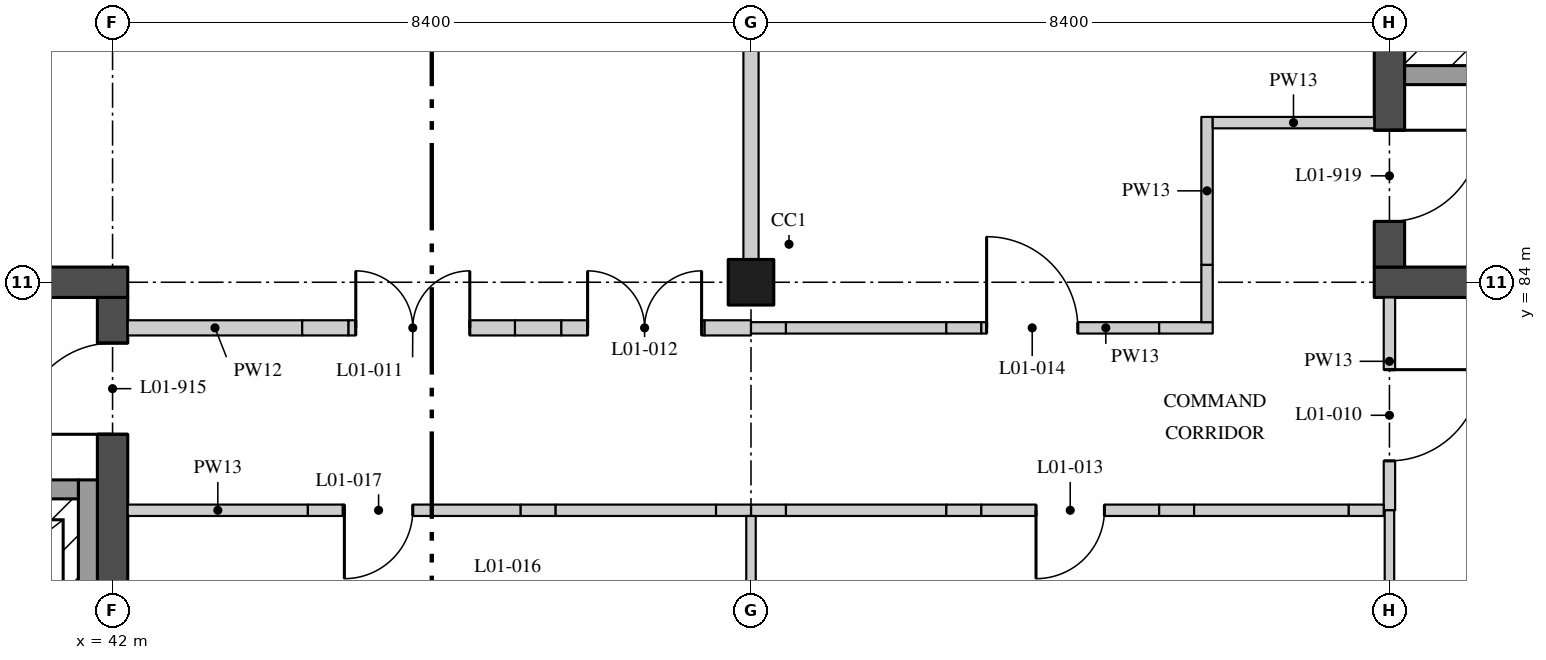
"""IFC4 building model, lengths in metres.
Left out: names, types, materials, properties, quantities, classifications, styles, units other than length and angle.
Written with IfcOpenShell. Run it as: python <this file> out.ifc"""

import sys

from ifc_helpers import new_model, si_unit, direction, frame, frame_2d, origin, origin_2d, place, context, subcontext, project, spatial, rectangle, extrude, element, fill, save


model = new_model("IFC4")
c1 = context("Model", 3, precision=1e-05, world=origin(), true_north=direction((0.0, 1.0)))
c2 = subcontext(c1, "Body", "Model", "MODEL_VIEW")
j1 = project(units=[si_unit("LENGTHUNIT", "METRE"), si_unit("PLANEANGLEUNIT", "RADIAN")], contexts=[c1])
p1 = place(None, origin())
s1 = spatial("IfcSite", under=j1, at=p1, CompositionType="ELEMENT")
p2 = place(p1, origin())
s2 = spatial("IfcBuilding", under=s1, at=p2, CompositionType="ELEMENT")
p3 = place(p2, frame((0.0, 0.0, 5.4)))
s3 = spatial("IfcBuildingStorey", under=s2, at=p3, CompositionType="ELEMENT", Elevation=5.4)
p4 = place(p3, frame((50.4, 84.0, 0.0), z_axis=(0.0, 0.0, 1.0), x_axis=(1.0, 0.0, 0.0)))
e1 = element("IfcColumn", 1, at=p4, inside=s3, PredefinedType="COLUMN", context=c2, shape_type="SweptSolid", body=[
    extrude(rectangle(XDim=0.6, YDim=0.6, at=origin_2d()), origin(), (0.0, 0.0, 1.0), 4.37),
])
p5 = place(p3, frame((33.4, 84.0, 0.0), z_axis=(0.0, 0.0, 1.0), x_axis=(1.0, 0.0, 0.0)))
e2 = element("IfcWall", 2, at=p5, inside=s3, PredefinedType="SHEAR", context=c2, shape_type="SweptSolid", body=[
    extrude(rectangle(XDim=8.8, YDim=0.4, at=frame_2d((4.4, 0.0))), origin(), (0.0, 0.0, 1.0), 4.37),
])
p6 = place(p3, frame((42.0, 75.8, 0.0), z_axis=(0.0, 0.0, 1.0), x_axis=(0.0, 1.0, 0.0)))
e3 = element("IfcWall", 3, at=p6, inside=s3, PredefinedType="SHEAR", context=c2, shape_type="SweptSolid", body=[
    extrude(rectangle(XDim=8.0, YDim=0.4, at=frame_2d((4.0, 0.0))), origin(), (0.0, 0.0, 1.0), 4.37),
])
p7 = place(p6, frame((6.2, 0.0, 0.0)))
e4 = element("IfcOpeningElement", 4, at=p7, cuts=e3, PredefinedType="OPENING", context=c2, shape_type="SweptSolid", body=[
    extrude(rectangle(XDim=1.2, YDim=2.1, at=frame_2d((0.6, 1.05))), frame((0.0, 0.21, 0.0), z_axis=(0.0, -1.0, 0.0), x_axis=(1.0, 0.0, 0.0)), (0.0, 0.0, 1.0), 0.42),
])
p8 = place(p3, frame((58.6, 84.0, 0.0), z_axis=(0.0, 0.0, 1.0), x_axis=(1.0, 0.0, 0.0)))
e5 = element("IfcWall", 5, at=p8, inside=s3, PredefinedType="SHEAR", context=c2, shape_type="SweptSolid", body=[
    extrude(rectangle(XDim=8.8, YDim=0.4, at=frame_2d((4.4, 0.0))), origin(), (0.0, 0.0, 1.0), 4.37),
])
p9 = place(p3, frame((58.8, 84.2, 0.0), z_axis=(0.0, 0.0, 1.0), x_axis=(0.0, 1.0, 0.0)))
e6 = element("IfcWall", 6, at=p9, inside=s3, PredefinedType="SHEAR", context=c2, shape_type="SweptSolid", body=[
    extrude(rectangle(XDim=8.0, YDim=0.4, at=frame_2d((4.0, 0.0))), origin(), (0.0, 0.0, 1.0), 4.37),
])
p10 = place(p9, frame((0.6, 0.0, 0.0)))
e7 = element("IfcOpeningElement", 7, at=p10, cuts=e6, PredefinedType="OPENING", context=c2, shape_type="SweptSolid", body=[
    extrude(rectangle(XDim=1.2, YDim=2.1, at=frame_2d((0.6, 1.05))), frame((0.0, 0.21, 0.0), z_axis=(0.0, -1.0, 0.0), x_axis=(1.0, 0.0, 0.0)), (0.0, 0.0, 1.0), 0.42),
])
p11 = place(p3, frame((61.8, 86.725, 0.0), z_axis=(0.0, 0.0, 1.0), x_axis=(-1.0, 0.0, 0.0)))
e8 = element("IfcWall", 8, at=p11, inside=s3, PredefinedType="SOLIDWALL", context=c2, shape_type="SweptSolid", body=[
    extrude(rectangle(XDim=2.8, YDim=0.25, at=frame_2d((1.4, 0.0))), origin(), (0.0, 0.0, 1.0), 4.37),
])
p12 = place(p3, frame((41.675, 78.75, 0.0), z_axis=(0.0, 0.0, 1.0), x_axis=(0.0, 1.0, 0.0)))
e9 = element("IfcWall", 9, at=p12, inside=s3, PredefinedType="SOLIDWALL", context=c2, shape_type="SweptSolid", body=[
    extrude(rectangle(XDim=2.65, YDim=0.25, at=frame_2d((1.325, 0.0))), origin(), (0.0, 0.0, 1.0), 4.37),
])
p13 = place(p3, frame((39.25, 81.275, 0.0), z_axis=(0.0, 0.0, 1.0), x_axis=(1.0, 0.0, 0.0)))
e10 = element("IfcWall", 10, at=p13, inside=s3, PredefinedType="SOLIDWALL", context=c2, shape_type="SweptSolid", body=[
    extrude(rectangle(XDim=2.3, YDim=0.25, at=frame_2d((1.15, 0.0))), origin(), (0.0, 0.0, 1.0), 4.37),
])
p14 = place(p3, frame((58.8, 81.0, 0.0), z_axis=(0.0, 0.0, 1.0), x_axis=(0.0, 1.0, 0.0)))
e11 = element("IfcWall", 11, at=p14, inside=s3, PredefinedType="PARTITIONING", context=c2, shape_type="SweptSolid", body=[
    extrude(rectangle(XDim=2.8, YDim=0.15, at=frame_2d((1.4, 0.0))), origin(), (0.0, 0.0, 1.0), 3.746),
])
p15 = place(p14, frame((0.65, 0.0, 0.0)))
e12 = element("IfcOpeningElement", 12, at=p15, cuts=e11, PredefinedType="OPENING", context=c2, shape_type="SweptSolid", body=[
    extrude(rectangle(XDim=1.2, YDim=2.4, at=frame_2d((0.6, 1.2))), frame((0.0, 0.085, 0.0), z_axis=(0.0, -1.0, 0.0), x_axis=(1.0, 0.0, 0.0)), (0.0, 0.0, 1.0), 0.17),
])
p16 = place(p3, frame((58.8, 75.95, 0.0), z_axis=(0.0, 0.0, 1.0), x_axis=(0.0, 1.0, 0.0)))
e13 = element("IfcWall", 13, at=p16, inside=s3, PredefinedType="PARTITIONING", context=c2, shape_type="SweptSolid", body=[
    extrude(rectangle(XDim=5.05, YDim=0.125, at=frame_2d((2.525, 0.0))), origin(), (0.0, 0.0, 1.0), 3.746),
])
p17 = place(p3, frame((42.2, 83.4, 0.0), z_axis=(0.0, 0.0, 1.0), x_axis=(1.0, 0.0, 0.0)))
e14 = element("IfcWall", 14, at=p17, inside=s3, PredefinedType="PARTITIONING", context=c2, shape_type="SweptSolid", body=[
    extrude(rectangle(XDim=2.295, YDim=0.2, at=frame_2d((1.147, 0.0))), origin(), (0.0, 0.0, 1.0), 4.37),
])
p18 = place(p3, frame((44.495, 83.4, 0.0), z_axis=(0.0, 0.0, 1.0), x_axis=(1.0, 0.0, 0.0)))
e15 = element("IfcWall", 15, at=p18, inside=s3, PredefinedType="PARTITIONING", context=c2, shape_type="SweptSolid", body=[
    extrude(rectangle(XDim=0.61, YDim=0.2, at=frame_2d((0.305, 0.0))), origin(), (0.0, 0.0, 1.0), 3.895),
])
p19 = place(p3, frame((45.105, 83.4, 0.0), z_axis=(0.0, 0.0, 1.0), x_axis=(1.0, 0.0, 0.0)))
e16 = element("IfcWall", 16, at=p19, inside=s3, PredefinedType="PARTITIONING", context=c2, shape_type="SweptSolid", body=[
    extrude(rectangle(XDim=2.19, YDim=0.2, at=frame_2d((1.095, 0.0))), origin(), (0.0, 0.0, 1.0), 4.37),
])
p20 = place(p19, frame((0.095, 0.0, 0.0)))
e17 = element("IfcOpeningElement", 17, at=p20, cuts=e16, PredefinedType="OPENING", context=c2, shape_type="SweptSolid", body=[
    extrude(rectangle(XDim=1.5, YDim=2.1, at=frame_2d((0.75, 1.05))), frame((0.0, 0.11, 0.0), z_axis=(0.0, -1.0, 0.0), x_axis=(1.0, 0.0, 0.0)), (0.0, 0.0, 1.0), 0.22),
])
p21 = place(p3, frame((47.295, 83.4, 0.0), z_axis=(0.0, 0.0, 1.0), x_axis=(1.0, 0.0, 0.0)))
e18 = element("IfcWall", 18, at=p21, inside=s3, PredefinedType="PARTITIONING", context=c2, shape_type="SweptSolid", body=[
    extrude(rectangle(XDim=0.61, YDim=0.2, at=frame_2d((0.305, 0.0))), origin(), (0.0, 0.0, 1.0), 3.895),
])
p22 = place(p3, frame((47.905, 83.4, 0.0), z_axis=(0.0, 0.0, 1.0), x_axis=(1.0, 0.0, 0.0)))
e19 = element("IfcWall", 19, at=p22, inside=s3, PredefinedType="PARTITIONING", context=c2, shape_type="SweptSolid", body=[
    extrude(rectangle(XDim=1.885, YDim=0.2, at=frame_2d((0.942, 0.0))), origin(), (0.0, 0.0, 1.0), 4.37),
])
p23 = place(p22, frame((0.345, 0.0, 0.0)))
e20 = element("IfcOpeningElement", 20, at=p23, cuts=e19, PredefinedType="OPENING", context=c2, shape_type="SweptSolid", body=[
    extrude(rectangle(XDim=1.5, YDim=2.1, at=frame_2d((0.75, 1.05))), frame((0.0, 0.11, 0.0), z_axis=(0.0, -1.0, 0.0), x_axis=(1.0, 0.0, 0.0)), (0.0, 0.0, 1.0), 0.22),
])
p24 = place(p3, frame((49.79, 83.4, 0.0), z_axis=(0.0, 0.0, 1.0), x_axis=(1.0, 0.0, 0.0)))
e21 = element("IfcWall", 21, at=p24, inside=s3, PredefinedType="PARTITIONING", context=c2, shape_type="SweptSolid", body=[
    extrude(rectangle(XDim=0.61, YDim=0.2, at=frame_2d((0.305, 0.0))), origin(), (0.0, 0.0, 1.0), 3.746),
])
p25 = place(p3, frame((50.4, 81.0, 0.0), z_axis=(0.0, 0.0, 1.0), x_axis=(1.0, 0.0, 0.0)))
e22 = element("IfcWall", 22, at=p25, inside=s3, PredefinedType="PARTITIONING", context=c2, shape_type="SweptSolid", body=[
    extrude(rectangle(XDim=0.46, YDim=0.15, at=frame_2d((0.23, 0.0))), origin(), (0.0, 0.0, 1.0), 3.746),
])
p26 = place(p3, frame((50.86, 81.0, 0.0), z_axis=(0.0, 0.0, 1.0), x_axis=(1.0, 0.0, 0.0)))
e23 = element("IfcWall", 23, at=p26, inside=s3, PredefinedType="PARTITIONING", context=c2, shape_type="SweptSolid", body=[
    extrude(rectangle(XDim=2.11, YDim=0.15, at=frame_2d((1.055, 0.0))), origin(), (0.0, 0.0, 1.0), 4.37),
])
p27 = place(p3, frame((52.97, 81.0, 0.0), z_axis=(0.0, 0.0, 1.0), x_axis=(1.0, 0.0, 0.0)))
e24 = element("IfcWall", 24, at=p27, inside=s3, PredefinedType="PARTITIONING", context=c2, shape_type="SweptSolid", body=[
    extrude(rectangle(XDim=0.46, YDim=0.15, at=frame_2d((0.23, 0.0))), origin(), (0.0, 0.0, 1.0), 3.895),
])
p28 = place(p3, frame((53.43, 81.0, 0.0), z_axis=(0.0, 0.0, 1.0), x_axis=(1.0, 0.0, 0.0)))
e25 = element("IfcWall", 25, at=p28, inside=s3, PredefinedType="PARTITIONING", context=c2, shape_type="SweptSolid", body=[
    extrude(rectangle(XDim=2.34, YDim=0.15, at=frame_2d((1.17, 0.0))), origin(), (0.0, 0.0, 1.0), 4.37),
])
p29 = place(p28, frame((0.72, 0.0, 0.0)))
e26 = element("IfcOpeningElement", 26, at=p29, cuts=e25, PredefinedType="OPENING", context=c2, shape_type="SweptSolid", body=[
    extrude(rectangle(XDim=0.9, YDim=2.1, at=frame_2d((0.45, 1.05))), frame((0.0, 0.085, 0.0), z_axis=(0.0, -1.0, 0.0), x_axis=(1.0, 0.0, 0.0)), (0.0, 0.0, 1.0), 0.17),
])
p30 = place(p3, frame((55.77, 81.0, 0.0), z_axis=(0.0, 0.0, 1.0), x_axis=(1.0, 0.0, 0.0)))
e27 = element("IfcWall", 27, at=p30, inside=s3, PredefinedType="PARTITIONING", context=c2, shape_type="SweptSolid", body=[
    extrude(rectangle(XDim=0.46, YDim=0.15, at=frame_2d((0.23, 0.0))), origin(), (0.0, 0.0, 1.0), 3.895),
])
p31 = place(p3, frame((56.23, 81.0, 0.0), z_axis=(0.0, 0.0, 1.0), x_axis=(1.0, 0.0, 0.0)))
e28 = element("IfcWall", 28, at=p31, inside=s3, PredefinedType="PARTITIONING", context=c2, shape_type="SweptSolid", body=[
    extrude(rectangle(XDim=2.035, YDim=0.15, at=frame_2d((1.018, 0.0))), origin(), (0.0, 0.0, 1.0), 4.37),
])
for number, where, z_axis, x_axis in (
    (29, (58.265, 81.0, 0.0), (0.0, 0.0, 1.0), (1.0, 0.0, 0.0)),
    (30, (50.4, 83.4, 0.0), (0.0, 0.0, 1.0), (1.0, 0.0, 0.0)),
):
    element("IfcWall", number, at=place(p3, frame(where, z_axis=z_axis, x_axis=x_axis)), inside=s3, PredefinedType="PARTITIONING", context=c2, shape_type="SweptSolid", body=[
        extrude(rectangle(XDim=0.46, YDim=0.15, at=frame_2d((0.23, 0.0))), origin(), (0.0, 0.0, 1.0), 3.746),
    ])
p32 = place(p3, frame((50.86, 83.4, 0.0), z_axis=(0.0, 0.0, 1.0), x_axis=(1.0, 0.0, 0.0)))
e31 = element("IfcWall", 31, at=p32, inside=s3, PredefinedType="PARTITIONING", context=c2, shape_type="SweptSolid", body=[
    extrude(rectangle(XDim=2.11, YDim=0.15, at=frame_2d((1.055, 0.0))), origin(), (0.0, 0.0, 1.0), 4.37),
])
p33 = place(p3, frame((52.97, 83.4, 0.0), z_axis=(0.0, 0.0, 1.0), x_axis=(1.0, 0.0, 0.0)))
e32 = element("IfcWall", 32, at=p33, inside=s3, PredefinedType="PARTITIONING", context=c2, shape_type="SweptSolid", body=[
    extrude(rectangle(XDim=0.46, YDim=0.15, at=frame_2d((0.23, 0.0))), origin(), (0.0, 0.0, 1.0), 3.895),
])
p34 = place(p3, frame((53.43, 83.4, 0.0), z_axis=(0.0, 0.0, 1.0), x_axis=(1.0, 0.0, 0.0)))
e33 = element("IfcWall", 33, at=p34, inside=s3, PredefinedType="PARTITIONING", context=c2, shape_type="SweptSolid", body=[
    extrude(rectangle(XDim=2.34, YDim=0.15, at=frame_2d((1.17, 0.0))), origin(), (0.0, 0.0, 1.0), 4.37),
])
p35 = place(p34, frame((0.07, 0.0, 0.0)))
e34 = element("IfcOpeningElement", 34, at=p35, cuts=e33, PredefinedType="OPENING", context=c2, shape_type="SweptSolid", body=[
    extrude(rectangle(XDim=1.2, YDim=2.4, at=frame_2d((0.6, 1.2))), frame((0.0, 0.085, 0.0), z_axis=(0.0, -1.0, 0.0), x_axis=(1.0, 0.0, 0.0)), (0.0, 0.0, 1.0), 0.17),
])
p36 = place(p3, frame((55.77, 83.4, 0.0), z_axis=(0.0, 0.0, 1.0), x_axis=(1.0, 0.0, 0.0)))
e35 = element("IfcWall", 35, at=p36, inside=s3, PredefinedType="PARTITIONING", context=c2, shape_type="SweptSolid", body=[
    extrude(rectangle(XDim=0.705, YDim=0.15, at=frame_2d((0.353, 0.0))), origin(), (0.0, 0.0, 1.0), 3.895),
])
p37 = place(p3, frame((56.4, 83.475, 0.0), z_axis=(0.0, 0.0, 1.0), x_axis=(0.0, 1.0, 0.0)))
e36 = element("IfcWall", 36, at=p37, inside=s3, PredefinedType="PARTITIONING", context=c2, shape_type="SweptSolid", body=[
    extrude(rectangle(XDim=0.755, YDim=0.15, at=frame_2d((0.377, 0.0))), origin(), (0.0, 0.0, 1.0), 3.746),
])
p38 = place(p3, frame((56.4, 84.23, 0.0), z_axis=(0.0, 0.0, 1.0), x_axis=(0.0, 1.0, 0.0)))
e37 = element("IfcWall", 37, at=p38, inside=s3, PredefinedType="PARTITIONING", context=c2, shape_type="SweptSolid", body=[
    extrude(rectangle(XDim=1.945, YDim=0.15, at=frame_2d((0.973, 0.0))), origin(), (0.0, 0.0, 1.0), 4.37),
])
p39 = place(p3, frame((56.475, 86.1, 0.0), z_axis=(0.0, 0.0, 1.0), x_axis=(1.0, 0.0, 0.0)))
e38 = element("IfcWall", 38, at=p39, inside=s3, PredefinedType="PARTITIONING", context=c2, shape_type="SweptSolid", body=[
    extrude(rectangle(XDim=2.125, YDim=0.15, at=frame_2d((1.062, 0.0))), origin(), (0.0, 0.0, 1.0), 4.37),
])
p40 = place(p3, frame((42.2, 81.0, 0.0), z_axis=(0.0, 0.0, 1.0), x_axis=(1.0, 0.0, 0.0)))
e39 = element("IfcWall", 39, at=p40, inside=s3, PredefinedType="PARTITIONING", context=c2, shape_type="SweptSolid", body=[
    extrude(rectangle(XDim=2.37, YDim=0.15, at=frame_2d((1.185, 0.0))), origin(), (0.0, 0.0, 1.0), 4.37),
])
p41 = place(p3, frame((44.57, 81.0, 0.0), z_axis=(0.0, 0.0, 1.0), x_axis=(1.0, 0.0, 0.0)))
e40 = element("IfcWall", 40, at=p41, inside=s3, PredefinedType="PARTITIONING", context=c2, shape_type="SweptSolid", body=[
    extrude(rectangle(XDim=0.46, YDim=0.15, at=frame_2d((0.23, 0.0))), origin(), (0.0, 0.0, 1.0), 3.895),
])
p42 = place(p3, frame((45.03, 81.0, 0.0), z_axis=(0.0, 0.0, 1.0), x_axis=(1.0, 0.0, 0.0)))
e41 = element("IfcWall", 41, at=p42, inside=s3, PredefinedType="PARTITIONING", context=c2, shape_type="SweptSolid", body=[
    extrude(rectangle(XDim=2.34, YDim=0.15, at=frame_2d((1.17, 0.0))), origin(), (0.0, 0.0, 1.0), 4.37),
])
p43 = place(p42, frame((0.02, 0.0, 0.0)))
e42 = element("IfcOpeningElement", 42, at=p43, cuts=e41, PredefinedType="OPENING", context=c2, shape_type="SweptSolid", body=[
    extrude(rectangle(XDim=0.9, YDim=2.1, at=frame_2d((0.45, 1.05))), frame((0.0, 0.085, 0.0), z_axis=(0.0, -1.0, 0.0), x_axis=(1.0, 0.0, 0.0)), (0.0, 0.0, 1.0), 0.17),
])
p44 = place(p3, frame((47.37, 81.0, 0.0), z_axis=(0.0, 0.0, 1.0), x_axis=(1.0, 0.0, 0.0)))
e43 = element("IfcWall", 43, at=p44, inside=s3, PredefinedType="PARTITIONING", context=c2, shape_type="SweptSolid", body=[
    extrude(rectangle(XDim=0.46, YDim=0.15, at=frame_2d((0.23, 0.0))), origin(), (0.0, 0.0, 1.0), 3.895),
])
p45 = place(p3, frame((47.83, 81.0, 0.0), z_axis=(0.0, 0.0, 1.0), x_axis=(1.0, 0.0, 0.0)))
e44 = element("IfcWall", 44, at=p45, inside=s3, PredefinedType="PARTITIONING", context=c2, shape_type="SweptSolid", body=[
    extrude(rectangle(XDim=2.11, YDim=0.15, at=frame_2d((1.055, 0.0))), origin(), (0.0, 0.0, 1.0), 4.37),
])
p46 = place(p3, frame((49.94, 81.0, 0.0), z_axis=(0.0, 0.0, 1.0), x_axis=(1.0, 0.0, 0.0)))
e45 = element("IfcWall", 45, at=p46, inside=s3, PredefinedType="PARTITIONING", context=c2, shape_type="SweptSolid", body=[
    extrude(rectangle(XDim=0.46, YDim=0.15, at=frame_2d((0.23, 0.0))), origin(), (0.0, 0.0, 1.0), 3.746),
])
p47 = place(p3, frame((50.4, 84.3, 0.0), z_axis=(0.0, 0.0, 1.0), x_axis=(0.0, 1.0, 0.0)))
e46 = element("IfcWall", 46, at=p47, inside=s3, PredefinedType="PARTITIONING", context=c2, shape_type="SweptSolid", body=[
    extrude(rectangle(XDim=7.75, YDim=0.2, at=frame_2d((3.875, 0.0))), origin(), (0.0, 0.0, 1.0), 3.746),
])
p48 = place(p3, frame((50.4, 78.6, 0.0), z_axis=(0.0, 0.0, 1.0), x_axis=(0.0, 1.0, 0.0)))
e47 = element("IfcWall", 47, at=p48, inside=s3, PredefinedType="PARTITIONING", context=c2, shape_type="SweptSolid", body=[
    extrude(rectangle(XDim=2.325, YDim=0.125, at=frame_2d((1.163, 0.0))), origin(), (0.0, 0.0, 1.0), 3.746),
])
p49 = place(p7, origin())
e48 = element("IfcDoor", 48, at=p49, inside=s3, OperationType="SINGLE_SWING_RIGHT", PredefinedType="DOOR", context=c2, shape_type="SweptSolid", body=[
    extrude(rectangle(XDim=1.2, YDim=2.1, at=frame_2d((0.6, 1.05))), frame((0.0, 0.035, 0.0), z_axis=(0.0, -1.0, 0.0), x_axis=(1.0, 0.0, 0.0)), (0.0, 0.0, 1.0), 0.07),
])
fill(e4, e48)
p50 = place(p10, frame((1.2, 0.0, 0.0), z_axis=(0.0, 0.0, 1.0), x_axis=(-1.0, 0.0, 0.0)))
e49 = element("IfcDoor", 49, at=p50, inside=s3, OperationType="SINGLE_SWING_RIGHT", PredefinedType="DOOR", context=c2, shape_type="SweptSolid", body=[
    extrude(rectangle(XDim=1.2, YDim=2.1, at=frame_2d((0.6, 1.05))), frame((0.0, 0.035, 0.0), z_axis=(0.0, -1.0, 0.0), x_axis=(1.0, 0.0, 0.0)), (0.0, 0.0, 1.0), 0.07),
])
fill(e7, e49)
p51 = place(p15, frame((1.2, 0.0, 0.0), z_axis=(0.0, 0.0, 1.0), x_axis=(-1.0, 0.0, 0.0)))
e50 = element("IfcDoor", 50, at=p51, inside=s3, OperationType="SINGLE_SWING_RIGHT", PredefinedType="DOOR", context=c2, shape_type="SweptSolid", body=[
    extrude(rectangle(XDim=1.2, YDim=2.4, at=frame_2d((0.6, 1.2))), frame((0.0, 0.025, 0.0), z_axis=(0.0, -1.0, 0.0), x_axis=(1.0, 0.0, 0.0)), (0.0, 0.0, 1.0), 0.05),
])
fill(e12, e50)
p52 = place(p20, origin())
e51 = element("IfcDoor", 51, at=p52, inside=s3, OperationType="DOUBLE_DOOR_SINGLE_SWING", PredefinedType="DOOR", context=c2, shape_type="SweptSolid", body=[
    extrude(rectangle(XDim=1.5, YDim=2.1, at=frame_2d((0.75, 1.05))), frame((0.0, 0.03, 0.0), z_axis=(0.0, -1.0, 0.0), x_axis=(1.0, 0.0, 0.0)), (0.0, 0.0, 1.0), 0.06),
])
fill(e17, e51)
p53 = place(p23, origin())
e52 = element("IfcDoor", 52, at=p53, inside=s3, OperationType="DOUBLE_DOOR_SINGLE_SWING", PredefinedType="DOOR", context=c2, shape_type="SweptSolid", body=[
    extrude(rectangle(XDim=1.5, YDim=2.1, at=frame_2d((0.75, 1.05))), frame((0.0, 0.03, 0.0), z_axis=(0.0, -1.0, 0.0), x_axis=(1.0, 0.0, 0.0)), (0.0, 0.0, 1.0), 0.06),
])
fill(e20, e52)
p54 = place(p29, frame((0.9, 0.0, 0.0), z_axis=(0.0, 0.0, 1.0), x_axis=(-1.0, 0.0, 0.0)))
e53 = element("IfcDoor", 53, at=p54, inside=s3, OperationType="SINGLE_SWING_LEFT", PredefinedType="DOOR", context=c2, shape_type="SweptSolid", body=[
    extrude(rectangle(XDim=0.9, YDim=2.1, at=frame_2d((0.45, 1.05))), frame((0.0, 0.025, 0.0), z_axis=(0.0, -1.0, 0.0), x_axis=(1.0, 0.0, 0.0)), (0.0, 0.0, 1.0), 0.05),
])
fill(e26, e53)
p55 = place(p35, origin())
e54 = element("IfcDoor", 54, at=p55, inside=s3, OperationType="SINGLE_SWING_RIGHT", PredefinedType="DOOR", context=c2, shape_type="SweptSolid", body=[
    extrude(rectangle(XDim=1.2, YDim=2.4, at=frame_2d((0.6, 1.2))), frame((0.0, 0.025, 0.0), z_axis=(0.0, -1.0, 0.0), x_axis=(1.0, 0.0, 0.0)), (0.0, 0.0, 1.0), 0.05),
])
fill(e34, e54)
p56 = place(p43, frame((0.9, 0.0, 0.0), z_axis=(0.0, 0.0, 1.0), x_axis=(-1.0, 0.0, 0.0)))
e55 = element("IfcDoor", 55, at=p56, inside=s3, OperationType="SINGLE_SWING_LEFT", PredefinedType="DOOR", context=c2, shape_type="SweptSolid", body=[
    extrude(rectangle(XDim=0.9, YDim=2.1, at=frame_2d((0.45, 1.05))), frame((0.0, 0.025, 0.0), z_axis=(0.0, -1.0, 0.0), x_axis=(1.0, 0.0, 0.0)), (0.0, 0.0, 1.0), 0.05),
])
fill(e42, e55)
save(model, sys.argv[1])
